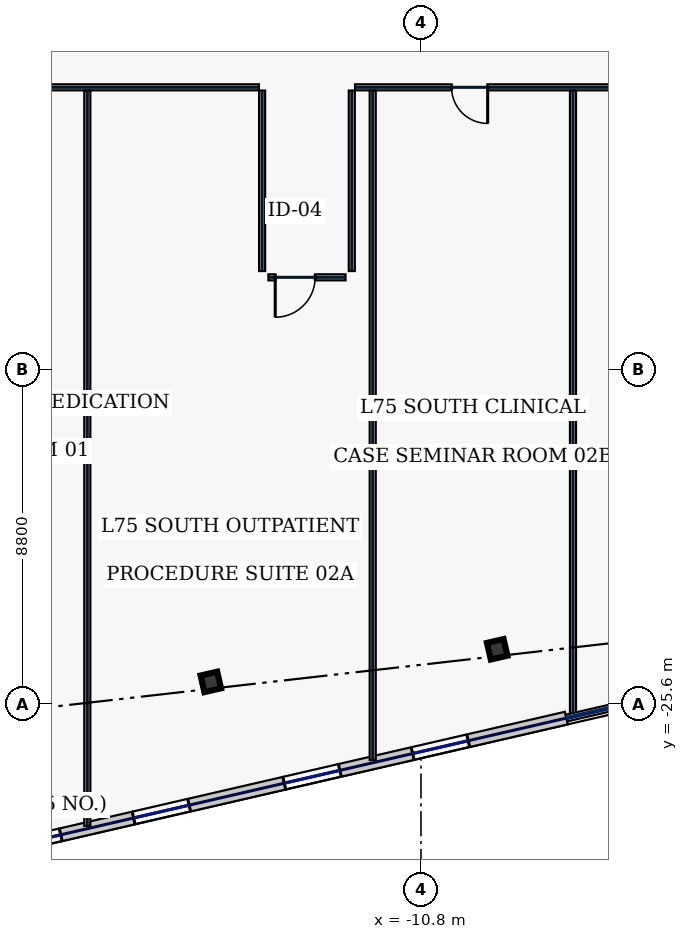
"""IFC4 building model, lengths in metres.
Left out: names, types, materials, properties, quantities, classifications, styles, units other than length and angle.
Written with IfcOpenShell. Run it as: python <this file> out.ifc"""

import sys

from ifc_helpers import new_model, si_unit, direction, frame, frame_2d, origin, origin_2d, place, context, subcontext, project, spatial, rectangle, hollow_rectangle, extrude, element, fill, save


model = new_model("IFC4")
c1 = context("Model", 3, precision=1e-05, world=origin(), true_north=direction((0.0, 1.0)))
c2 = subcontext(c1, "Body", "Model", "MODEL_VIEW")
j1 = project(units=[si_unit("LENGTHUNIT", "METRE"), si_unit("PLANEANGLEUNIT", "RADIAN")], contexts=[c1])
p1 = place(None, origin())
s1 = spatial("IfcSite", under=j1, at=p1, CompositionType="ELEMENT")
p2 = place(p1, origin())
s2 = spatial("IfcBuilding", under=s1, at=p2, CompositionType="ELEMENT")
p3 = place(p2, frame((0.0, 0.0, 321.0)))
s3 = spatial("IfcBuildingStorey", under=s2, at=p3, CompositionType="ELEMENT", Elevation=321.0)
for number, where, z_axis, x_axis in (
    (1, (-16.33, -25.027, 0.0), (0.0, 0.0, 1.0), (0.974, 0.225, 0.0)),
    (2, (-8.794, -24.168, 0.0), (0.0, 0.0, 1.0), (0.974, 0.225, 0.0)),
):
    element("IfcColumn", number, at=place(p3, frame(where, z_axis=z_axis, x_axis=x_axis)), inside=s3, PredefinedType="COLUMN", context=c2, shape_type="SweptSolid", body=[
        extrude(hollow_rectangle(XDim=0.45, YDim=0.45, WallThickness=0.022, at=origin_2d()), origin(), (0.0, 0.0, 1.0), 3.74),
    ])
p4 = place(p3, frame((-24.03, -29.916, 0.0), z_axis=(0.0, 0.0, 1.0), x_axis=(0.974370978061, 0.224947098473, 0.0)))
e3 = element("IfcWall", 3, at=p4, inside=s3, PredefinedType="STANDARD", context=c2, shape_type="SweptSolid", body=[
    extrude(rectangle(XDim=17.506, YDim=0.34, at=frame_2d((8.753, 0.0))), origin(), (0.0, 0.0, 1.0), 3.74),
])
p5 = place(p4, frame((2.35, 0.0, 0.9)))
e4 = element("IfcOpeningElement", 4, at=p5, cuts=e3, PredefinedType="OPENING", context=c2, shape_type="SweptSolid", body=[
    extrude(rectangle(XDim=1.5, YDim=2.0, at=frame_2d((0.75, 1.0))), frame((0.0, 0.18, 0.0), z_axis=(0.0, -1.0, 0.0), x_axis=(1.0, 0.0, 0.0)), (0.0, 0.0, 1.0), 0.36),
])
p6 = place(p4, frame((5.817, 0.0, 0.9)))
e5 = element("IfcOpeningElement", 5, at=p6, cuts=e3, PredefinedType="OPENING", context=c2, shape_type="SweptSolid", body=[
    extrude(rectangle(XDim=1.5, YDim=2.0, at=frame_2d((0.75, 1.0))), frame((0.0, 0.18, 0.0), z_axis=(0.0, -1.0, 0.0), x_axis=(1.0, 0.0, 0.0)), (0.0, 0.0, 1.0), 0.36),
])
p7 = place(p4, frame((9.886, 0.0, 0.9)))
e6 = element("IfcOpeningElement", 6, at=p7, cuts=e3, PredefinedType="OPENING", context=c2, shape_type="SweptSolid", body=[
    extrude(rectangle(XDim=1.5, YDim=2.0, at=frame_2d((0.75, 1.0))), frame((0.0, 0.18, 0.0), z_axis=(0.0, -1.0, 0.0), x_axis=(1.0, 0.0, 0.0)), (0.0, 0.0, 1.0), 0.36),
])
p8 = place(p4, frame((13.353, 0.0, 0.9)))
e7 = element("IfcOpeningElement", 7, at=p8, cuts=e3, PredefinedType="OPENING", context=c2, shape_type="SweptSolid", body=[
    extrude(rectangle(XDim=1.5, YDim=2.0, at=frame_2d((0.75, 1.0))), frame((0.0, 0.18, 0.0), z_axis=(0.0, -1.0, 0.0), x_axis=(1.0, 0.0, 0.0)), (0.0, 0.0, 1.0), 0.36),
])
p9 = place(p3, frame((24.145, -9.38, 0.0), z_axis=(0.0, 0.0, 1.0), x_axis=(-1.0, 0.0, 0.0)))
e8 = element("IfcWall", 8, at=p9, inside=s3, PredefinedType="PARTITIONING", context=c2, shape_type="SweptSolid", body=[
    extrude(rectangle(XDim=36.68, YDim=0.16, at=frame_2d((18.34, 0.0))), origin(), (0.0, 0.0, 1.0), 3.74),
])
p10 = place(p9, frame((33.19, 0.0, 0.0)))
e9 = element("IfcOpeningElement", 9, at=p10, cuts=e8, PredefinedType="OPENING", context=c2, shape_type="SweptSolid", body=[
    extrude(rectangle(XDim=0.95, YDim=2.2, at=frame_2d((0.475, 1.1))), frame((0.0, 0.09, 0.0), z_axis=(0.0, -1.0, 0.0), x_axis=(1.0, 0.0, 0.0)), (0.0, 0.0, 1.0), 0.18),
])
p11 = place(p9, frame((26.43, 0.0, 0.0)))
e10 = element("IfcOpeningElement", 10, at=p11, cuts=e8, PredefinedType="OPENING", context=c2, shape_type="SweptSolid", body=[
    extrude(rectangle(XDim=0.95, YDim=2.2, at=frame_2d((0.475, 1.1))), frame((0.0, 0.09, 0.0), z_axis=(0.0, -1.0, 0.0), x_axis=(1.0, 0.0, 0.0)), (0.0, 0.0, 1.0), 0.18),
])
p12 = place(p9, frame((18.63, 0.0, 0.0)))
e11 = element("IfcOpeningElement", 11, at=p12, cuts=e8, PredefinedType="OPENING", context=c2, shape_type="SweptSolid", body=[
    extrude(rectangle(XDim=1.15, YDim=2.2, at=frame_2d((0.575, 1.1))), frame((0.0, 0.09, 0.0), z_axis=(0.0, -1.0, 0.0), x_axis=(1.0, 0.0, 0.0)), (0.0, 0.0, 1.0), 0.18),
])
p13 = place(p9, frame((9.565, 0.0, 0.0)))
e12 = element("IfcOpeningElement", 12, at=p13, cuts=e8, PredefinedType="OPENING", context=c2, shape_type="SweptSolid", body=[
    extrude(rectangle(XDim=0.95, YDim=2.2, at=frame_2d((0.475, 1.1))), frame((0.0, 0.09, 0.0), z_axis=(0.0, -1.0, 0.0), x_axis=(1.0, 0.0, 0.0)), (0.0, 0.0, 1.0), 0.18),
])
p14 = place(p9, frame((1.869, 0.0, 0.0)))
e13 = element("IfcOpeningElement", 13, at=p14, cuts=e8, PredefinedType="OPENING", context=c2, shape_type="SweptSolid", body=[
    extrude(rectangle(XDim=1.3, YDim=2.2, at=frame_2d((0.65, 1.1))), frame((0.0, 0.09, 0.0), z_axis=(0.0, -1.0, 0.0), x_axis=(1.0, 0.0, 0.0)), (0.0, 0.0, 1.0), 0.18),
])
p15 = place(p3, frame((-12.62, -9.465, 0.0), z_axis=(0.0, 0.0, 1.0), x_axis=(0.0, -1.0, 0.0)))
e14 = element("IfcWall", 14, at=p15, inside=s3, PredefinedType="PARTITIONING", context=c2, shape_type="SweptSolid", body=[
    extrude(rectangle(XDim=4.75, YDim=0.16, at=frame_2d((2.375, 0.0))), origin(), (0.0, 0.0, 1.0), 3.74),
])
p16 = place(p3, frame((-12.785, -14.38, 0.0), z_axis=(0.0, 0.0, 1.0), x_axis=(-1.0, 0.0, 0.0)))
e15 = element("IfcWall", 15, at=p16, inside=s3, PredefinedType="PARTITIONING", context=c2, shape_type="SweptSolid", body=[
    extrude(rectangle(XDim=2.03, YDim=0.16, at=frame_2d((1.015, 0.0))), origin(), (0.0, 0.0, 1.0), 3.74),
])
p17 = place(p16, frame((0.8, 0.0, 0.0)))
e16 = element("IfcOpeningElement", 16, at=p17, cuts=e15, PredefinedType="OPENING", context=c2, shape_type="SweptSolid", body=[
    extrude(rectangle(XDim=1.05, YDim=2.2, at=frame_2d((0.525, 1.1))), frame((0.0, 0.09, 0.0), z_axis=(0.0, -1.0, 0.0), x_axis=(1.0, 0.0, 0.0)), (0.0, 0.0, 1.0), 0.18),
])
p18 = place(p3, frame((-14.98, -14.215, 0.0), z_axis=(0.0, 0.0, 1.0), x_axis=(0.0, 1.0, 0.0)))
e17 = element("IfcWall", 17, at=p18, inside=s3, PredefinedType="PARTITIONING", context=c2, shape_type="SweptSolid", body=[
    extrude(rectangle(XDim=4.75, YDim=0.16, at=frame_2d((2.375, 0.0))), origin(), (0.0, 0.0, 1.0), 3.74),
])
p19 = place(p3, frame((-15.065, -9.38, 0.0), z_axis=(0.0, 0.0, 1.0), x_axis=(-1.0, 0.0, 0.0)))
e18 = element("IfcWall", 18, at=p19, inside=s3, PredefinedType="PARTITIONING", context=c2, shape_type="SweptSolid", body=[
    extrude(rectangle(XDim=9.08, YDim=0.16, at=frame_2d((4.54, 0.0))), origin(), (0.0, 0.0, 1.0), 3.74),
])
p20 = place(p19, frame((6.256, 0.0, 0.0)))
e19 = element("IfcOpeningElement", 19, at=p20, cuts=e18, PredefinedType="OPENING", context=c2, shape_type="SweptSolid", body=[
    extrude(rectangle(XDim=0.95, YDim=2.2, at=frame_2d((0.475, 1.1))), frame((0.0, 0.09, 0.0), z_axis=(0.0, -1.0, 0.0), x_axis=(1.0, 0.0, 0.0)), (0.0, 0.0, 1.0), 0.18),
])
p21 = place(p3, frame((-19.58, -28.817, 0.0), z_axis=(0.0, 0.0, 1.0), x_axis=(0.0, 1.0, 0.0)))
e20 = element("IfcWall", 20, at=p21, inside=s3, PredefinedType="PARTITIONING", context=c2, shape_type="SweptSolid", body=[
    extrude(rectangle(XDim=19.352, YDim=0.16, at=frame_2d((9.676, 0.0))), origin(), (0.0, 0.0, 1.0), 3.74),
])
p22 = place(p3, frame((-6.8, -25.867, 0.0), z_axis=(0.0, 0.0, 1.0), x_axis=(0.0, 1.0, 0.0)))
e21 = element("IfcWall", 21, at=p22, inside=s3, PredefinedType="PARTITIONING", context=c2, shape_type="SweptSolid", body=[
    extrude(rectangle(XDim=16.402, YDim=0.16, at=frame_2d((8.201, 0.0))), origin(), (0.0, 0.0, 1.0), 3.74),
])
p23 = place(p3, frame((-12.07, -27.083, 0.0), z_axis=(0.0, 0.0, 1.0), x_axis=(0.0, 1.0, 0.0)))
e22 = element("IfcWall", 22, at=p23, inside=s3, PredefinedType="PARTITIONING", context=c2, shape_type="SweptSolid", body=[
    extrude(rectangle(XDim=17.618, YDim=0.16, at=frame_2d((8.809, 0.0))), origin(), (0.0, 0.0, 1.0), 3.74),
])
p24 = place(p5, origin())
e23 = element("IfcWindow", 23, at=p24, inside=s3, PartitioningType="SINGLE_PANEL", PredefinedType="WINDOW", context=c2, shape_type="SweptSolid", body=[
    extrude(rectangle(XDim=1.5, YDim=2.0, at=frame_2d((0.75, 1.0))), frame((0.0, 0.03, 0.0), z_axis=(0.0, -1.0, 0.0), x_axis=(1.0, 0.0, 0.0)), (0.0, 0.0, 1.0), 0.06),
])
fill(e4, e23)
p25 = place(p6, origin())
e24 = element("IfcWindow", 24, at=p25, inside=s3, PartitioningType="SINGLE_PANEL", PredefinedType="WINDOW", context=c2, shape_type="SweptSolid", body=[
    extrude(rectangle(XDim=1.5, YDim=2.0, at=frame_2d((0.75, 1.0))), frame((0.0, 0.03, 0.0), z_axis=(0.0, -1.0, 0.0), x_axis=(1.0, 0.0, 0.0)), (0.0, 0.0, 1.0), 0.06),
])
fill(e5, e24)
p26 = place(p7, origin())
e25 = element("IfcWindow", 25, at=p26, inside=s3, PartitioningType="SINGLE_PANEL", PredefinedType="WINDOW", context=c2, shape_type="SweptSolid", body=[
    extrude(rectangle(XDim=1.5, YDim=2.0, at=frame_2d((0.75, 1.0))), frame((0.0, 0.03, 0.0), z_axis=(0.0, -1.0, 0.0), x_axis=(1.0, 0.0, 0.0)), (0.0, 0.0, 1.0), 0.06),
])
fill(e6, e25)
p27 = place(p8, origin())
e26 = element("IfcWindow", 26, at=p27, inside=s3, PartitioningType="SINGLE_PANEL", PredefinedType="WINDOW", context=c2, shape_type="SweptSolid", body=[
    extrude(rectangle(XDim=1.5, YDim=2.0, at=frame_2d((0.75, 1.0))), frame((0.0, 0.03, 0.0), z_axis=(0.0, -1.0, 0.0), x_axis=(1.0, 0.0, 0.0)), (0.0, 0.0, 1.0), 0.06),
])
fill(e7, e26)
p28 = place(p17, origin())
e27 = element("IfcDoor", 27, at=p28, inside=s3, OperationType="SINGLE_SWING_RIGHT", PredefinedType="DOOR", context=c2, shape_type="SweptSolid", body=[
    extrude(rectangle(XDim=1.05, YDim=2.2, at=frame_2d((0.525, 1.1))), frame((0.0, 0.025, 0.0), z_axis=(0.0, -1.0, 0.0), x_axis=(1.0, 0.0, 0.0)), (0.0, 0.0, 1.0), 0.05),
])
fill(e16, e27)
p29 = place(p10, origin())
e28 = element("IfcDoor", 28, at=p29, inside=s3, OperationType="SINGLE_SWING_LEFT", PredefinedType="DOOR", context=c2, shape_type="SweptSolid", body=[
    extrude(rectangle(XDim=0.95, YDim=2.2, at=frame_2d((0.475, 1.1))), frame((0.0, 0.025, 0.0), z_axis=(0.0, -1.0, 0.0), x_axis=(1.0, 0.0, 0.0)), (0.0, 0.0, 1.0), 0.05),
])
fill(e9, e28)
save(model, sys.argv[1])
